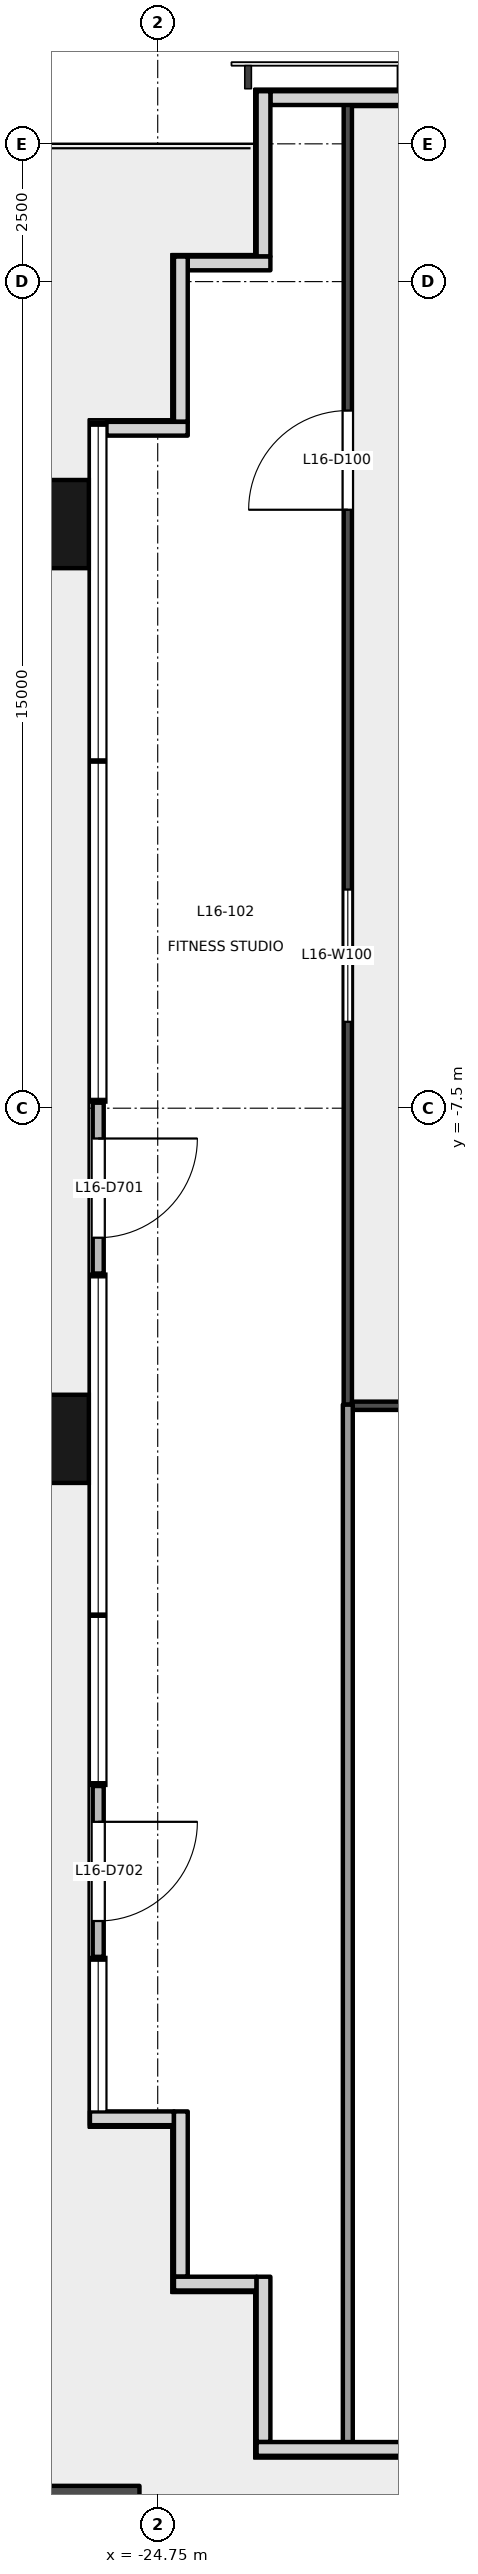
"""IFC4 building model, lengths in metres.
Left out: names, types, materials, properties, quantities, classifications, styles, units other than length and angle.
Written with IfcOpenShell. Run it as: python <this file> out.ifc"""

import sys

from ifc_helpers import new_model, si_unit, direction, frame, frame_2d, origin, origin_2d, place, context, subcontext, project, spatial, rectangle, extrude, element, fill, save


model = new_model("IFC4")
c1 = context("Model", 3, precision=1e-05, world=origin(), true_north=direction((0.0, 1.0)))
c2 = subcontext(c1, "Body", "Model", "MODEL_VIEW")
j1 = project(units=[si_unit("LENGTHUNIT", "METRE"), si_unit("PLANEANGLEUNIT", "RADIAN")], contexts=[c1])
p1 = place(None, origin())
s1 = spatial("IfcSite", under=j1, at=p1, CompositionType="ELEMENT")
p2 = place(p1, origin())
s2 = spatial("IfcBuilding", under=s1, at=p2, CompositionType="ELEMENT")
p3 = place(p2, frame((0.0, 0.0, 74.3)))
s3 = spatial("IfcBuildingStorey", under=s2, at=p3, CompositionType="ELEMENT", Elevation=74.3)
for number, where, z_axis, x_axis in (
    (1, (-26.9, -13.5, -0.2), (0.0, 0.0, 1.0), (0.0, 1.0, 0.0)),
    (2, (-26.9, 3.1, -0.2), (0.0, 0.0, 1.0), (0.0, 1.0, 0.0)),
):
    element("IfcColumn", number, at=place(p3, frame(where, z_axis=z_axis, x_axis=x_axis)), inside=s3, PredefinedType="COLUMN", context=c2, shape_type="SweptSolid", body=[
        extrude(rectangle(XDim=1.6, YDim=1.8, at=origin_2d()), origin(), (0.0, 0.0, 1.0), 5.4),
    ])
p4 = place(p3, frame((-20.0, 10.83, 0.0), z_axis=(0.0, 0.0, 1.0), x_axis=(-1.0, 0.0, 0.0)))
e3 = element("IfcWall", 3, at=p4, inside=s3, PredefinedType="SOLIDWALL", context=c2, shape_type="SweptSolid", body=[
    extrude(rectangle(XDim=2.705, YDim=0.25, at=frame_2d((1.353, 0.0))), origin(), (0.0, 0.0, 1.0), 5.2),
])
p5 = place(p3, frame((-22.83, 10.955, 0.0), z_axis=(0.0, 0.0, 1.0), x_axis=(0.0, -1.0, 0.0)))
e4 = element("IfcWall", 4, at=p5, inside=s3, PredefinedType="SOLIDWALL", context=c2, shape_type="SweptSolid", body=[
    extrude(rectangle(XDim=3.0, YDim=0.25, at=frame_2d((1.5, 0.0))), origin(), (0.0, 0.0, 1.0), 5.2),
])
p6 = place(p3, frame((-22.705, 7.83, 0.0), z_axis=(0.0, 0.0, 1.0), x_axis=(-1.0, 0.0, 0.0)))
e5 = element("IfcWall", 5, at=p6, inside=s3, PredefinedType="SOLIDWALL", context=c2, shape_type="SweptSolid", body=[
    extrude(rectangle(XDim=1.5, YDim=0.25, at=frame_2d((0.75, 0.0))), origin(), (0.0, 0.0, 1.0), 5.2),
])
p7 = place(p3, frame((-24.33, 7.955, 0.0), z_axis=(0.0, 0.0, 1.0), x_axis=(0.0, -1.0, 0.0)))
e6 = element("IfcWall", 6, at=p7, inside=s3, PredefinedType="SOLIDWALL", context=c2, shape_type="SweptSolid", body=[
    extrude(rectangle(XDim=3.0, YDim=0.25, at=frame_2d((1.5, 0.0))), origin(), (0.0, 0.0, 1.0), 5.2),
])
p8 = place(p3, frame((-24.205, 4.83, 0.0), z_axis=(0.0, 0.0, 1.0), x_axis=(-1.0, 0.0, 0.0)))
e7 = element("IfcWall", 7, at=p8, inside=s3, PredefinedType="SOLIDWALL", context=c2, shape_type="SweptSolid", body=[
    extrude(rectangle(XDim=1.475, YDim=0.25, at=frame_2d((0.737, 0.0))), origin(), (0.0, 0.0, 1.0), 5.2),
])
p9 = place(p3, frame((-25.83, -7.4, 0.0), z_axis=(0.0, 0.0, 1.0), x_axis=(0.0, -1.0, 0.0)))
e8 = element("IfcWall", 8, at=p9, inside=s3, PredefinedType="SOLIDWALL", context=c2, shape_type="SweptSolid", body=[
    extrude(rectangle(XDim=3.1, YDim=0.2, at=frame_2d((1.55, 0.0))), origin(), (0.0, 0.0, 1.0), 4.1),
])
p10 = place(p9, frame((0.65, 0.0, 0.0)))
e9 = element("IfcOpeningElement", 9, at=p10, cuts=e8, PredefinedType="OPENING", context=c2, shape_type="SweptSolid", body=[
    extrude(rectangle(XDim=1.8, YDim=2.4, at=frame_2d((0.9, 1.2))), frame((0.0, 0.111, 0.0), z_axis=(0.0, -1.0, 0.0), x_axis=(1.0, 0.0, 0.0)), (0.0, 0.0, 1.0), 0.221),
])
p11 = place(p3, frame((-25.83, -19.8, 0.0), z_axis=(0.0, 0.0, 1.0), x_axis=(0.0, -1.0, 0.0)))
e10 = element("IfcWall", 10, at=p11, inside=s3, PredefinedType="SOLIDWALL", context=c2, shape_type="SweptSolid", body=[
    extrude(rectangle(XDim=3.1, YDim=0.2, at=frame_2d((1.55, 0.0))), origin(), (0.0, 0.0, 1.0), 5.2),
])
p12 = place(p11, frame((0.65, 0.0, 0.0)))
e11 = element("IfcOpeningElement", 11, at=p12, cuts=e10, PredefinedType="OPENING", context=c2, shape_type="SweptSolid", body=[
    extrude(rectangle(XDim=1.8, YDim=2.4, at=frame_2d((0.9, 1.2))), frame((0.0, 0.111, 0.0), z_axis=(0.0, -1.0, 0.0), x_axis=(1.0, 0.0, 0.0)), (0.0, 0.0, 1.0), 0.221),
])
p13 = place(p3, frame((-25.98, -25.83, 0.0), z_axis=(0.0, 0.0, 1.0), x_axis=(1.0, 0.0, 0.0)))
e12 = element("IfcWall", 12, at=p13, inside=s3, PredefinedType="SOLIDWALL", context=c2, shape_type="SweptSolid", body=[
    extrude(rectangle(XDim=1.525, YDim=0.25, at=frame_2d((0.762, 0.0))), origin(), (0.0, 0.0, 1.0), 5.2),
])
p14 = place(p3, frame((-24.33, -25.705, 0.0), z_axis=(0.0, 0.0, 1.0), x_axis=(0.0, -1.0, 0.0)))
e13 = element("IfcWall", 13, at=p14, inside=s3, PredefinedType="SOLIDWALL", context=c2, shape_type="SweptSolid", body=[
    extrude(rectangle(XDim=3.0, YDim=0.25, at=frame_2d((1.5, 0.0))), origin(), (0.0, 0.0, 1.0), 5.2),
])
p15 = place(p3, frame((-24.455, -28.83, 0.0), z_axis=(0.0, 0.0, 1.0), x_axis=(1.0, 0.0, 0.0)))
e14 = element("IfcWall", 14, at=p15, inside=s3, PredefinedType="SOLIDWALL", context=c2, shape_type="SweptSolid", body=[
    extrude(rectangle(XDim=1.5, YDim=0.25, at=frame_2d((0.75, 0.0))), origin(), (0.0, 0.0, 1.0), 5.2),
])
p16 = place(p3, frame((-22.83, -28.705, 0.0), z_axis=(0.0, 0.0, 1.0), x_axis=(0.0, -1.0, 0.0)))
e15 = element("IfcWall", 15, at=p16, inside=s3, PredefinedType="SOLIDWALL", context=c2, shape_type="SweptSolid", body=[
    extrude(rectangle(XDim=3.0, YDim=0.25, at=frame_2d((1.5, 0.0))), origin(), (0.0, 0.0, 1.0), 5.2),
])
p17 = place(p3, frame((-22.955, -31.83, 0.0), z_axis=(0.0, 0.0, 1.0), x_axis=(1.0, 0.0, 0.0)))
e16 = element("IfcWall", 16, at=p17, inside=s3, PredefinedType="SOLIDWALL", context=c2, shape_type="SweptSolid", body=[
    extrude(rectangle(XDim=2.955, YDim=0.25, at=frame_2d((1.478, 0.0))), origin(), (0.0, 0.0, 1.0), 5.2),
])
p18 = place(p3, frame((-25.081, -32.8, 0.0), z_axis=(0.0, 0.0, 1.0), x_axis=(-1.0, 0.0, 0.0)))
e17 = element("IfcWall", 17, at=p18, inside=s3, PredefinedType="SOLIDWALL", context=c2, shape_type="SweptSolid", body=[
    extrude(rectangle(XDim=3.469, YDim=0.6, at=frame_2d((1.734, 0.0))), origin(), (0.0, 0.0, 1.0), 0.7),
])
p19 = place(p3, frame((-21.3, -12.88, 0.0), z_axis=(0.0, 0.0, 1.0), x_axis=(0.0, 1.0, 0.0)))
e18 = element("IfcWall", 18, at=p19, inside=s3, PredefinedType="PARTITIONING", context=c2, shape_type="SweptSolid", body=[
    extrude(rectangle(XDim=23.62, YDim=0.15, at=frame_2d((11.81, 0.0))), origin(), (0.0, 0.0, 1.0), 4.8),
])
p20 = place(p19, frame((16.24, 0.0, 0.0)))
e19 = element("IfcOpeningElement", 19, at=p20, cuts=e18, PredefinedType="OPENING", context=c2, shape_type="SweptSolid", body=[
    extrude(rectangle(XDim=1.8, YDim=2.1, at=frame_2d((0.9, 1.05))), frame((0.0, 0.085, 0.0), z_axis=(0.0, -1.0, 0.0), x_axis=(1.0, 0.0, 0.0)), (0.0, 0.0, 1.0), 0.171),
])
p21 = place(p19, frame((6.948, 0.0, 0.0)))
e20 = element("IfcOpeningElement", 20, at=p21, cuts=e18, PredefinedType="OPENING", context=c2, shape_type="SweptSolid", body=[
    extrude(rectangle(XDim=2.4, YDim=2.4, at=frame_2d((1.2, 1.2))), frame((0.0, 0.085, 0.0), z_axis=(0.0, -1.0, 0.0), x_axis=(1.0, 0.0, 0.0)), (0.0, 0.0, 1.0), 0.171),
])
p22 = place(p3, frame((-2.443, -12.9, 0.0), z_axis=(0.0, 0.0, 1.0), x_axis=(-1.0, 0.0, 0.0)))
e21 = element("IfcWall", 21, at=p22, inside=s3, PredefinedType="PARTITIONING", context=c2, shape_type="SweptSolid", body=[
    extrude(rectangle(XDim=18.782, YDim=0.15, at=frame_2d((9.391, 0.0))), origin(), (0.0, 0.0, 1.0), 4.2),
])
p23 = place(p22, frame((4.37, 0.0, 0.0)))
e22 = element("IfcOpeningElement", 22, at=p23, cuts=e21, PredefinedType="OPENING", context=c2, shape_type="SweptSolid", body=[
    extrude(rectangle(XDim=1.8, YDim=2.1, at=frame_2d((0.9, 1.05))), frame((0.0, 0.085, 0.0), z_axis=(0.0, -1.0, 0.0), x_axis=(1.0, 0.0, 0.0)), (0.0, 0.0, 1.0), 0.171),
])
p24 = place(p22, frame((11.269, 0.0, 0.0)))
e23 = element("IfcOpeningElement", 23, at=p24, cuts=e21, PredefinedType="OPENING", context=c2, shape_type="SweptSolid", body=[
    extrude(rectangle(XDim=2.4, YDim=2.4, at=frame_2d((1.2, 1.2))), frame((0.0, 0.085, 0.0), z_axis=(0.0, -1.0, 0.0), x_axis=(1.0, 0.0, 0.0)), (0.0, 0.0, 1.0), 0.171),
])
p25 = place(p3, frame((-21.3, -12.88, 0.0), z_axis=(0.0, 0.0, 1.0), x_axis=(0.0, -1.0, 0.0)))
e24 = element("IfcWall", 24, at=p25, inside=s3, PredefinedType="PARTITIONING", context=c2, shape_type="SweptSolid", body=[
    extrude(rectangle(XDim=18.86, YDim=0.18, at=frame_2d((9.43, 0.0))), origin(), (0.0, 0.0, 1.0), 5.2),
])
p26 = place(p10, origin())
e25 = element("IfcDoor", 25, at=p26, inside=s3, OperationType="DOUBLE_DOOR_SINGLE_SWING", PredefinedType="DOOR", context=c2, shape_type="SweptSolid", body=[
    extrude(rectangle(XDim=1.8, YDim=2.4, at=frame_2d((0.9, 1.2))), frame((0.0, 0.025, 0.0), z_axis=(0.0, -1.0, 0.0), x_axis=(1.0, 0.0, 0.0)), (0.0, 0.0, 1.0), 0.05),
])
fill(e9, e25)
p27 = place(p12, origin())
e26 = element("IfcDoor", 26, at=p27, inside=s3, OperationType="DOUBLE_DOOR_SINGLE_SWING", PredefinedType="DOOR", context=c2, shape_type="SweptSolid", body=[
    extrude(rectangle(XDim=1.8, YDim=2.4, at=frame_2d((0.9, 1.2))), frame((0.0, 0.025, 0.0), z_axis=(0.0, -1.0, 0.0), x_axis=(1.0, 0.0, 0.0)), (0.0, 0.0, 1.0), 0.05),
])
fill(e11, e26)
p28 = place(p20, origin())
e27 = element("IfcDoor", 27, at=p28, inside=s3, OperationType="DOUBLE_DOOR_SINGLE_SWING", PredefinedType="DOOR", context=c2, shape_type="SweptSolid", body=[
    extrude(rectangle(XDim=1.8, YDim=2.1, at=frame_2d((0.9, 1.05))), frame((0.0, 0.025, 0.0), z_axis=(0.0, -1.0, 0.0), x_axis=(1.0, 0.0, 0.0)), (0.0, 0.0, 1.0), 0.05),
])
fill(e19, e27)
p29 = place(p21, origin())
e28 = element("IfcWindow", 28, at=p29, inside=s3, PartitioningType="SINGLE_PANEL", PredefinedType="WINDOW", context=c2, shape_type="SweptSolid", body=[
    extrude(rectangle(XDim=2.4, YDim=2.4, at=frame_2d((1.2, 1.2))), frame((0.0, 0.03, 0.0), z_axis=(0.0, -1.0, 0.0), x_axis=(1.0, 0.0, 0.0)), (0.0, 0.0, 1.0), 0.06),
])
fill(e20, e28)
save(model, sys.argv[1])
